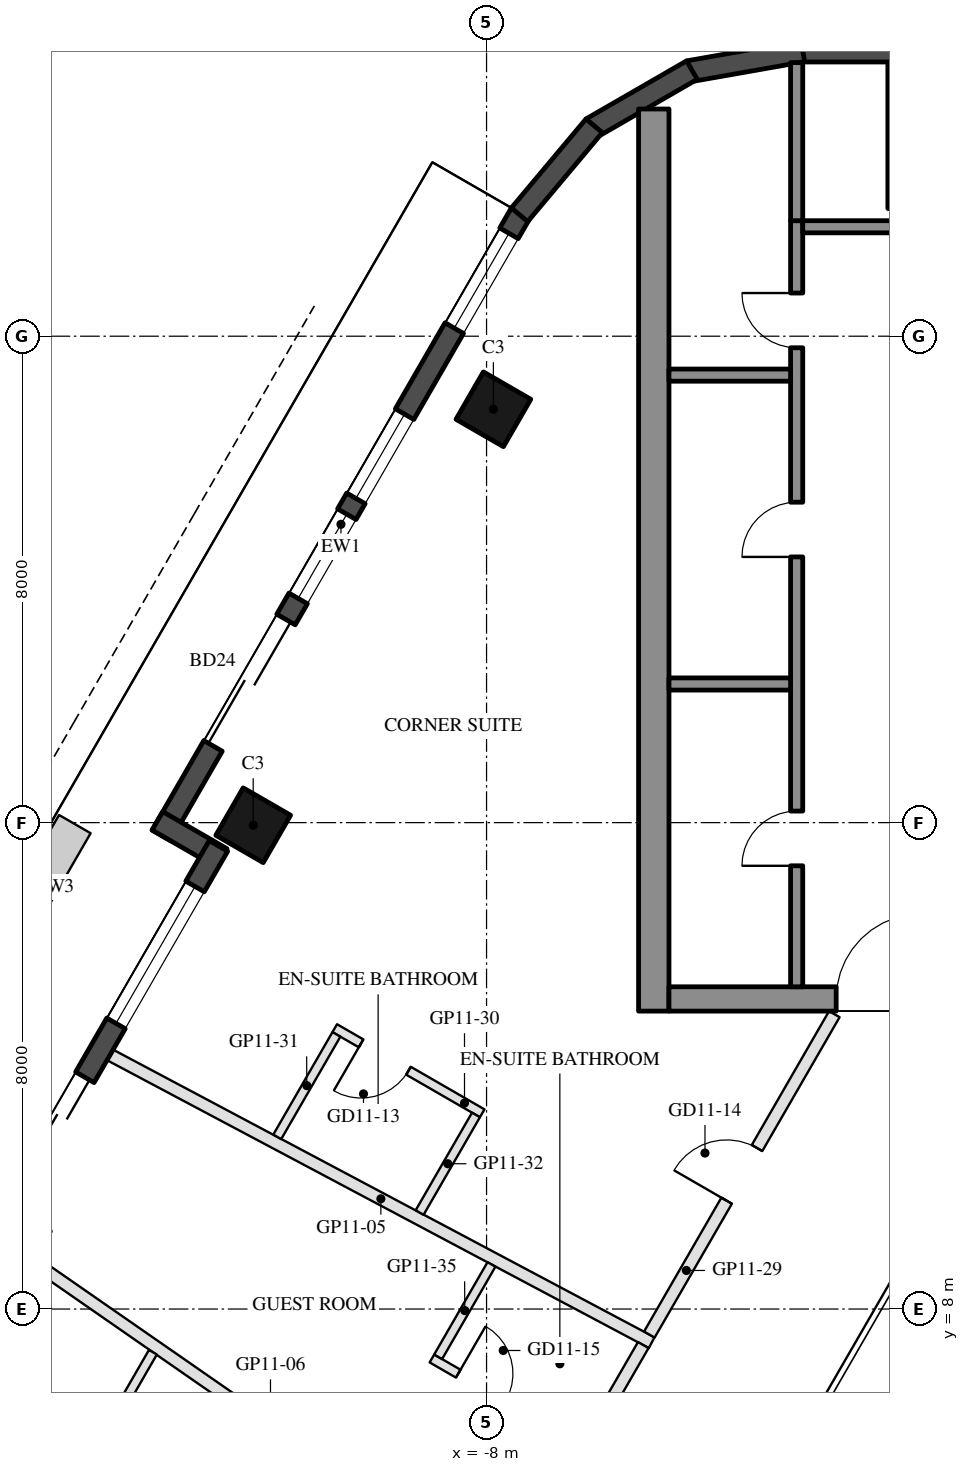
"""IFC4 building model, lengths in metres.
Left out: names, types, materials, properties, quantities, classifications, styles, units other than length and angle.
Written with IfcOpenShell. Run it as: python <this file> out.ifc"""

import sys

from ifc_helpers import new_model, si_unit, direction, frame, frame_2d, origin, origin_2d, place, context, subcontext, project, spatial, rectangle, hollow_rectangle, extrude, element, fill, save


model = new_model("IFC4")
c1 = context("Model", 3, precision=1e-05, world=origin(), true_north=direction((0.0, 1.0)))
c2 = subcontext(c1, "Body", "Model", "MODEL_VIEW")
j1 = project(units=[si_unit("LENGTHUNIT", "METRE"), si_unit("PLANEANGLEUNIT", "RADIAN")], contexts=[c1])
p1 = place(None, origin())
s1 = spatial("IfcSite", under=j1, at=p1, CompositionType="ELEMENT")
p2 = place(p1, origin())
s2 = spatial("IfcBuilding", under=s1, at=p2, CompositionType="ELEMENT")
p3 = place(p2, frame((0.0, 0.0, 127.9)))
s3 = spatial("IfcBuildingStorey", under=s2, at=p3, CompositionType="ELEMENT", Elevation=127.9)
for number, where, z_axis, x_axis in (
    (1, (-7.888, 22.798, 0.0), (0.0, 0.0, 1.0), (0.5, 0.866, 0.0)),
    (2, (-11.838, 15.957, 0.0), (0.0, 0.0, 1.0), (0.5, 0.866, 0.0)),
):
    element("IfcColumn", number, at=place(p3, frame(where, z_axis=z_axis, x_axis=x_axis)), inside=s3, PredefinedType="COLUMN", context=c2, shape_type="SweptSolid", body=[
        extrude(hollow_rectangle(XDim=0.9, YDim=0.9, WallThickness=0.04, at=origin_2d()), origin(), (0.0, 0.0, 1.0), 3.7),
    ])
p4 = place(p3, frame((0.0, 27.3, 0.0), z_axis=(0.0, 0.0, 1.0), x_axis=(1.0, 0.0, 0.0)))
e3 = element("IfcColumn", 3, at=p4, inside=s3, PredefinedType="COLUMN", context=c2, shape_type="SweptSolid", body=[
    extrude(hollow_rectangle(XDim=2.8, YDim=2.4, WallThickness=0.07, at=origin_2d()), origin(), (0.0, 0.0, 1.0), 3.7),
])
p5 = place(p3, frame((-7.441, 26.022, 0.0), z_axis=(0.0, 0.0, 1.0), x_axis=(-0.499992533062, -0.86602971478, 0.0)))
e4 = element("IfcWall", 4, at=p5, inside=s3, PredefinedType="SOLIDWALL", context=c2, shape_type="SweptSolid", body=[
    extrude(rectangle(XDim=11.816, YDim=0.35, at=frame_2d((5.908, 0.0))), origin(), (0.0, 0.0, 1.0), 3.45),
])
p6 = place(p5, frame((0.381, 0.0, 0.3)))
e5 = element("IfcOpeningElement", 5, at=p6, cuts=e4, PredefinedType="OPENING", context=c2, shape_type="SweptSolid", body=[
    extrude(rectangle(XDim=1.8, YDim=2.65, at=frame_2d((0.9, 1.325))), frame((0.0, 0.185, 0.0), z_axis=(0.0, -1.0, 0.0), x_axis=(1.0, 0.0, 0.0)), (0.0, 0.0, 1.0), 0.37),
])
p7 = place(p5, frame((7.716, 0.0, 0.0)))
e6 = element("IfcOpeningElement", 6, at=p7, cuts=e4, PredefinedType="OPENING", context=c2, shape_type="SweptSolid", body=[
    extrude(rectangle(XDim=2.4, YDim=2.4, at=frame_2d((1.2, 1.2))), frame((0.0, 0.185, 0.0), z_axis=(0.0, -1.0, 0.0), x_axis=(1.0, 0.0, 0.0)), (0.0, 0.0, 1.0), 0.37),
])
p8 = place(p5, frame((3.815, 0.0, 0.3)))
e7 = element("IfcOpeningElement", 7, at=p8, cuts=e4, PredefinedType="OPENING", context=c2, shape_type="SweptSolid", body=[
    extrude(rectangle(XDim=1.6, YDim=2.65, at=frame_2d((0.8, 1.325))), frame((0.0, 0.185, 0.0), z_axis=(0.0, -1.0, 0.0), x_axis=(1.0, 0.0, 0.0)), (0.0, 0.0, 1.0), 0.37),
])
p9 = place(p5, frame((5.715, 0.0, 0.3)))
e8 = element("IfcOpeningElement", 8, at=p9, cuts=e4, PredefinedType="OPENING", context=c2, shape_type="SweptSolid", body=[
    extrude(rectangle(XDim=1.6, YDim=2.65, at=frame_2d((0.8, 1.325))), frame((0.0, 0.185, 0.0), z_axis=(0.0, -1.0, 0.0), x_axis=(1.0, 0.0, 0.0)), (0.0, 0.0, 1.0), 0.37),
])
p10 = place(p3, frame((-13.413, 16.029, 0.0), z_axis=(0.0, 0.0, 1.0), x_axis=(0.866005645448, -0.500034220881, 0.0)))
e9 = element("IfcWall", 9, at=p10, inside=s3, PredefinedType="SOLIDWALL", context=c2, shape_type="SweptSolid", body=[
    extrude(rectangle(XDim=1.22, YDim=0.35, at=frame_2d((0.61, 0.0))), origin(), (0.0, 0.0, 1.0), 3.45),
])
p11 = place(p3, frame((-12.409, 15.617, 0.0), z_axis=(0.0, 0.0, 1.0), x_axis=(-0.500003597184, -0.866023326939, 0.0)))
e10 = element("IfcWall", 10, at=p11, inside=s3, PredefinedType="SOLIDWALL", context=c2, shape_type="SweptSolid", body=[
    extrude(rectangle(XDim=6.74, YDim=0.35, at=frame_2d((3.37, 0.0))), origin(), (0.0, 0.0, 1.0), 3.45),
])
p12 = place(p11, frame((0.77, 0.0, 0.3)))
e11 = element("IfcOpeningElement", 11, at=p12, cuts=e10, PredefinedType="OPENING", context=c2, shape_type="SweptSolid", body=[
    extrude(rectangle(XDim=2.6, YDim=2.65, at=frame_2d((1.3, 1.325))), frame((0.0, 0.185, 0.0), z_axis=(0.0, -1.0, 0.0), x_axis=(1.0, 0.0, 0.0)), (0.0, 0.0, 1.0), 0.37),
])
p13 = place(p11, frame((4.394, 0.0, 0.0)))
e12 = element("IfcOpeningElement", 12, at=p13, cuts=e10, PredefinedType="OPENING", context=c2, shape_type="SweptSolid", body=[
    extrude(rectangle(XDim=1.5, YDim=2.4, at=frame_2d((0.75, 1.2))), frame((0.0, 0.185, 0.0), z_axis=(0.0, -1.0, 0.0), x_axis=(1.0, 0.0, 0.0)), (0.0, 0.0, 1.0), 0.37),
])
p14 = place(p3, frame((2.829, 28.685, 0.0), z_axis=(0.0, 0.0, 1.0), x_axis=(-1.0, 0.0, 0.0)))
e13 = element("IfcWall", 13, at=p14, inside=s3, PredefinedType="SOLIDWALL", context=c2, shape_type="SweptSolid", body=[
    extrude(rectangle(XDim=5.658, YDim=0.35, at=frame_2d((2.829, 0.0))), origin(), (0.0, 0.0, 1.0), 3.45),
])
for number, where, z_axis, x_axis in (
    (14, (-2.799, 28.688, 0.0), (0.0, 0.0, 1.0), (-0.985, -0.174, 0.0)),
    (15, (-4.623, 28.377, 0.0), (0.0, 0.0, 1.0), (-0.866, -0.5, 0.0)),
):
    element("IfcWall", number, at=place(p3, frame(where, z_axis=z_axis, x_axis=x_axis)), inside=s3, PredefinedType="SOLIDWALL", context=c2, shape_type="SweptSolid", body=[
        extrude(rectangle(XDim=1.91, YDim=0.35, at=frame_2d((0.955, 0.0))), origin(), (0.0, 0.0, 1.0), 3.45),
    ])
p15 = place(p3, frame((-6.23, 27.461, 0.0), z_axis=(0.0, 0.0, 1.0), x_axis=(-0.642808304945, -0.766027077259, 0.0)))
e16 = element("IfcWall", 16, at=p15, inside=s3, PredefinedType="SOLIDWALL", context=c2, shape_type="SweptSolid", body=[
    extrude(rectangle(XDim=1.91, YDim=0.35, at=frame_2d((0.955, 0.0))), origin(), (0.0, 0.0, 1.0), 3.45),
])
p16 = place(p3, frame((-5.25, 12.9, 0.0), z_axis=(0.0, 0.0, 1.0), x_axis=(0.0, 1.0, 0.0)))
e17 = element("IfcWall", 17, at=p16, inside=s3, PredefinedType="SHEAR", context=c2, shape_type="SweptSolid", body=[
    extrude(rectangle(XDim=14.837, YDim=0.5, at=frame_2d((7.418, 0.0))), origin(), (0.0, 0.0, 1.0), 3.45),
])
p17 = place(p3, frame((5.0, 13.1, 0.0), z_axis=(0.0, 0.0, 1.0), x_axis=(-1.0, 0.0, 0.0)))
e18 = element("IfcWall", 18, at=p17, inside=s3, PredefinedType="SHEAR", context=c2, shape_type="SweptSolid", body=[
    extrude(rectangle(XDim=10.0, YDim=0.4, at=frame_2d((5.0, 0.0))), origin(), (0.0, 0.0, 1.0), 3.45),
])
p18 = place(p17, frame((3.55, 0.0, 0.0)))
e19 = element("IfcOpeningElement", 19, at=p18, cuts=e18, PredefinedType="OPENING", context=c2, shape_type="SweptSolid", body=[
    extrude(rectangle(XDim=1.1, YDim=2.1, at=frame_2d((0.55, 1.05))), frame((0.0, 0.21, 0.0), z_axis=(0.0, -1.0, 0.0), x_axis=(1.0, 0.0, 0.0)), (0.0, 0.0, 1.0), 0.42),
])
p19 = place(p17, frame((5.85, 0.0, 0.0)))
e20 = element("IfcOpeningElement", 20, at=p19, cuts=e18, PredefinedType="OPENING", context=c2, shape_type="SweptSolid", body=[
    extrude(rectangle(XDim=1.4, YDim=2.1, at=frame_2d((0.7, 1.05))), frame((0.0, 0.21, 0.0), z_axis=(0.0, -1.0, 0.0), x_axis=(1.0, 0.0, 0.0)), (0.0, 0.0, 1.0), 0.42),
])
p20 = place(p3, frame((-2.9, 13.3, 0.0), z_axis=(0.0, 0.0, 1.0), x_axis=(0.0, 1.0, 0.0)))
e21 = element("IfcWall", 21, at=p20, inside=s3, PredefinedType="SHEAR", context=c2, shape_type="SweptSolid", body=[
    extrude(rectangle(XDim=12.6, YDim=0.2, at=frame_2d((6.3, 0.0))), origin(), (0.0, 0.0, 1.0), 3.45),
])
p21 = place(p20, frame((1.99, 0.0, 0.0)))
e22 = element("IfcOpeningElement", 22, at=p21, cuts=e21, PredefinedType="OPENING", context=c2, shape_type="SweptSolid", body=[
    extrude(rectangle(XDim=0.9, YDim=2.1, at=frame_2d((0.45, 1.05))), frame((0.0, 0.11, 0.0), z_axis=(0.0, -1.0, 0.0), x_axis=(1.0, 0.0, 0.0)), (0.0, 0.0, 1.0), 0.22),
])
p22 = place(p20, frame((7.07, 0.0, 0.0)))
e23 = element("IfcOpeningElement", 23, at=p22, cuts=e21, PredefinedType="OPENING", context=c2, shape_type="SweptSolid", body=[
    extrude(rectangle(XDim=0.9, YDim=2.1, at=frame_2d((0.45, 1.05))), frame((0.0, 0.11, 0.0), z_axis=(0.0, -1.0, 0.0), x_axis=(1.0, 0.0, 0.0)), (0.0, 0.0, 1.0), 0.22),
])
p23 = place(p20, frame((10.51, 0.0, 0.0)))
e24 = element("IfcOpeningElement", 24, at=p23, cuts=e21, PredefinedType="OPENING", context=c2, shape_type="SweptSolid", body=[
    extrude(rectangle(XDim=0.9, YDim=2.1, at=frame_2d((0.45, 1.05))), frame((0.0, 0.11, 0.0), z_axis=(0.0, -1.0, 0.0), x_axis=(1.0, 0.0, 0.0)), (0.0, 0.0, 1.0), 0.22),
])
p24 = place(p3, frame((-0.4, 25.8, 0.0), z_axis=(0.0, 0.0, 1.0), x_axis=(-1.0, 0.0, 0.0)))
e25 = element("IfcWall", 25, at=p24, inside=s3, PredefinedType="SHEAR", context=c2, shape_type="SweptSolid", body=[
    extrude(rectangle(XDim=2.4, YDim=0.2, at=frame_2d((1.2, 0.0))), origin(), (0.0, 0.0, 1.0), 3.45),
])
for number, where, z_axis, x_axis in (
    (26, (-3.0, 18.28, 0.0), (0.0, 0.0, 1.0), (-1.0, 0.0, 0.0)),
    (27, (-3.0, 23.36, 0.0), (0.0, 0.0, 1.0), (-1.0, 0.0, 0.0)),
):
    element("IfcWall", number, at=place(p3, frame(where, z_axis=z_axis, x_axis=x_axis)), inside=s3, PredefinedType="SHEAR", context=c2, shape_type="SweptSolid", body=[
        extrude(rectangle(XDim=2.0, YDim=0.2, at=frame_2d((1.0, 0.0))), origin(), (0.0, 0.0, 1.0), 3.45),
    ])
p25 = place(p3, frame((-2.9, 25.9, 0.0), z_axis=(0.0, 0.0, 1.0), x_axis=(0.0, 1.0, 0.0)))
e28 = element("IfcWall", 28, at=p25, inside=s3, PredefinedType="SHEAR", context=c2, shape_type="SweptSolid", body=[
    extrude(rectangle(XDim=2.6, YDim=0.2, at=frame_2d((1.3, 0.0))), origin(), (0.0, 0.0, 1.0), 3.45),
])
p26 = place(p3, frame((-14.192, 12.179, 0.0), z_axis=(0.0, 0.0, 1.0), x_axis=(0.883106944183, -0.469171743753, 0.0)))
e29 = element("IfcWall", 29, at=p26, inside=s3, PredefinedType="PARTITIONING", context=c2, shape_type="SweptSolid", body=[
    extrude(rectangle(XDim=10.086, YDim=0.2, at=frame_2d((5.043, 0.0))), origin(), (0.0, 0.0, 1.0), 2.76),
])
p27 = place(p3, frame((-15.46, 8.781, 0.0), z_axis=(0.0, 0.0, 1.0), x_axis=(0.82142273434, -0.570319815113, 0.0)))
e30 = element("IfcWall", 30, at=p27, inside=s3, PredefinedType="PARTITIONING", context=c2, shape_type="SweptSolid", body=[
    extrude(rectangle(XDim=9.513, YDim=0.2, at=frame_2d((4.756, 0.0))), origin(), (0.0, 0.0, 1.0), 2.76),
])
p28 = place(p3, frame((-5.323, 7.581, 0.0), z_axis=(0.0, 0.0, 1.0), x_axis=(0.49998410452, 0.866034580849, 0.0)))
e31 = element("IfcWall", 31, at=p28, inside=s3, PredefinedType="PARTITIONING", context=c2, shape_type="SweptSolid", body=[
    extrude(rectangle(XDim=6.085, YDim=0.2, at=frame_2d((3.042, 0.0))), origin(), (0.0, 0.0, 1.0), 2.76),
])
p29 = place(p28, frame((2.542, 0.0, 0.0)))
e32 = element("IfcOpeningElement", 32, at=p29, cuts=e31, PredefinedType="OPENING", context=c2, shape_type="SweptSolid", body=[
    extrude(rectangle(XDim=1.0, YDim=2.1, at=frame_2d((0.5, 1.05))), frame((0.0, 0.11, 0.0), z_axis=(0.0, -1.0, 0.0), x_axis=(1.0, 0.0, 0.0)), (0.0, 0.0, 1.0), 0.22),
])
p30 = place(p3, frame((-8.072, 11.219, 0.0), z_axis=(0.0, 0.0, 1.0), x_axis=(-0.866034573852, 0.49998411664, 0.0)))
e33 = element("IfcWall", 33, at=p30, inside=s3, PredefinedType="PARTITIONING", context=c2, shape_type="SweptSolid", body=[
    extrude(rectangle(XDim=2.8, YDim=0.15, at=frame_2d((1.4, 0.0))), origin(), (0.0, 0.0, 1.0), 3.45),
])
p31 = place(p30, frame((1.4, 0.0, 0.0)))
e34 = element("IfcOpeningElement", 34, at=p31, cuts=e33, PredefinedType="OPENING", context=c2, shape_type="SweptSolid", body=[
    extrude(rectangle(XDim=0.9, YDim=2.1, at=frame_2d((0.45, 1.05))), frame((0.0, 0.085, 0.0), z_axis=(0.0, -1.0, 0.0), x_axis=(1.0, 0.0, 0.0)), (0.0, 0.0, 1.0), 0.17),
])
p32 = place(p3, frame((-10.469, 12.517, 0.0), z_axis=(0.0, 0.0, 1.0), x_axis=(-0.500051850797, -0.865995465643, 0.0)))
e35 = element("IfcWall", 35, at=p32, inside=s3, PredefinedType="PARTITIONING", context=c2, shape_type="SweptSolid", body=[
    extrude(rectangle(XDim=1.946, YDim=0.15, at=frame_2d((0.973, 0.0))), origin(), (0.0, 0.0, 1.0), 2.76),
])
p33 = place(p3, frame((-8.174, 11.192, 0.0), z_axis=(0.0, 0.0, 1.0), x_axis=(-0.500022870649, -0.866012199007, 0.0)))
e36 = element("IfcWall", 36, at=p33, inside=s3, PredefinedType="PARTITIONING", context=c2, shape_type="SweptSolid", body=[
    extrude(rectangle(XDim=1.853, YDim=0.15, at=frame_2d((0.926, 0.0))), origin(), (0.0, 0.0, 1.0), 2.76),
])
p34 = place(p3, frame((-7.679, 3.5, 0.0), z_axis=(0.0, 0.0, 1.0), x_axis=(0.500026934738, 0.866009852448, 0.0)))
e37 = element("IfcWall", 37, at=p34, inside=s3, PredefinedType="PARTITIONING", context=c2, shape_type="SweptSolid", body=[
    extrude(rectangle(XDim=4.511, YDim=0.2, at=frame_2d((2.256, 0.0))), origin(), (0.0, 0.0, 1.0), 2.76),
])
p35 = place(p34, frame((1.058, 0.0, 0.0)))
e38 = element("IfcOpeningElement", 38, at=p35, cuts=e37, PredefinedType="OPENING", context=c2, shape_type="SweptSolid", body=[
    extrude(rectangle(XDim=1.0, YDim=2.1, at=frame_2d((0.5, 1.05))), frame((0.0, 0.11, 0.0), z_axis=(0.0, -1.0, 0.0), x_axis=(1.0, 0.0, 0.0)), (0.0, 0.0, 1.0), 0.22),
])
p36 = place(p3, frame((-8.899, 7.187, 0.0), z_axis=(0.0, 0.0, 1.0), x_axis=(0.866056369097, -0.49994636267, 0.0)))
e39 = element("IfcWall", 39, at=p36, inside=s3, PredefinedType="PARTITIONING", context=c2, shape_type="SweptSolid", body=[
    extrude(rectangle(XDim=2.8, YDim=0.15, at=frame_2d((1.4, 0.0))), origin(), (0.0, 0.0, 1.0), 3.45),
])
p37 = place(p36, frame((0.5, 0.0, 0.0)))
e40 = element("IfcOpeningElement", 40, at=p37, cuts=e39, PredefinedType="OPENING", context=c2, shape_type="SweptSolid", body=[
    extrude(rectangle(XDim=0.9, YDim=2.1, at=frame_2d((0.45, 1.05))), frame((0.0, 0.085, 0.0), z_axis=(0.0, -1.0, 0.0), x_axis=(1.0, 0.0, 0.0)), (0.0, 0.0, 1.0), 0.17),
])
p38 = place(p3, frame((-7.919, 8.734, 0.0), z_axis=(0.0, 0.0, 1.0), x_axis=(-0.499971461383, -0.866041879935, 0.0)))
e41 = element("IfcWall", 41, at=p38, inside=s3, PredefinedType="PARTITIONING", context=c2, shape_type="SweptSolid", body=[
    extrude(rectangle(XDim=1.754, YDim=0.15, at=frame_2d((0.877, 0.0))), origin(), (0.0, 0.0, 1.0), 3.45),
])
p39 = place(p3, frame((-13.487, 7.29, 0.0), z_axis=(0.0, 0.0, 1.0), x_axis=(-0.500044586128, -0.865999660441, 0.0)))
e42 = element("IfcWall", 42, at=p39, inside=s3, PredefinedType="PARTITIONING", context=c2, shape_type="SweptSolid", body=[
    extrude(rectangle(XDim=2.077, YDim=0.15, at=frame_2d((1.039, 0.0))), origin(), (0.0, 0.0, 1.0), 3.45),
])
p40 = place(p6, origin())
e43 = element("IfcWindow", 43, at=p40, inside=s3, PartitioningType="SINGLE_PANEL", PredefinedType="WINDOW", context=c2, shape_type="SweptSolid", body=[
    extrude(rectangle(XDim=1.8, YDim=2.65, at=frame_2d((0.9, 1.325))), frame((0.0, 0.03, 0.0), z_axis=(0.0, -1.0, 0.0), x_axis=(1.0, 0.0, 0.0)), (0.0, 0.0, 1.0), 0.06),
])
fill(e5, e43)
p41 = place(p7, frame((2.4, 0.0, 0.0), z_axis=(0.0, 0.0, 1.0), x_axis=(-1.0, 0.0, 0.0)))
e44 = element("IfcDoor", 44, at=p41, inside=s3, OperationType="SLIDING_TO_LEFT", PredefinedType="DOOR", context=c2, shape_type="SweptSolid", body=[
    extrude(rectangle(XDim=2.4, YDim=2.4, at=frame_2d((1.2, 1.2))), frame((0.0, 0.025, 0.0), z_axis=(0.0, -1.0, 0.0), x_axis=(1.0, 0.0, 0.0)), (0.0, 0.0, 1.0), 0.05),
])
fill(e6, e44)
p42 = place(p8, origin())
e45 = element("IfcWindow", 45, at=p42, inside=s3, PartitioningType="SINGLE_PANEL", PredefinedType="WINDOW", context=c2, shape_type="SweptSolid", body=[
    extrude(rectangle(XDim=1.6, YDim=2.65, at=frame_2d((0.8, 1.325))), frame((0.0, 0.03, 0.0), z_axis=(0.0, -1.0, 0.0), x_axis=(1.0, 0.0, 0.0)), (0.0, 0.0, 1.0), 0.06),
])
fill(e7, e45)
p43 = place(p9, origin())
e46 = element("IfcWindow", 46, at=p43, inside=s3, PartitioningType="SINGLE_PANEL", PredefinedType="WINDOW", context=c2, shape_type="SweptSolid", body=[
    extrude(rectangle(XDim=1.6, YDim=2.65, at=frame_2d((0.8, 1.325))), frame((0.0, 0.03, 0.0), z_axis=(0.0, -1.0, 0.0), x_axis=(1.0, 0.0, 0.0)), (0.0, 0.0, 1.0), 0.06),
])
fill(e8, e46)
p44 = place(p12, origin())
e47 = element("IfcWindow", 47, at=p44, inside=s3, PartitioningType="SINGLE_PANEL", PredefinedType="WINDOW", context=c2, shape_type="SweptSolid", body=[
    extrude(rectangle(XDim=2.6, YDim=2.65, at=frame_2d((1.3, 1.325))), frame((0.0, 0.03, 0.0), z_axis=(0.0, -1.0, 0.0), x_axis=(1.0, 0.0, 0.0)), (0.0, 0.0, 1.0), 0.06),
])
fill(e11, e47)
p45 = place(p13, frame((1.5, 0.0, 0.0), z_axis=(0.0, 0.0, 1.0), x_axis=(-1.0, 0.0, 0.0)))
e48 = element("IfcDoor", 48, at=p45, inside=s3, OperationType="SLIDING_TO_LEFT", PredefinedType="DOOR", context=c2, shape_type="SweptSolid", body=[
    extrude(rectangle(XDim=1.5, YDim=2.4, at=frame_2d((0.75, 1.2))), frame((0.0, 0.025, 0.0), z_axis=(0.0, -1.0, 0.0), x_axis=(1.0, 0.0, 0.0)), (0.0, 0.0, 1.0), 0.05),
])
fill(e12, e48)
p46 = place(p21, origin())
e49 = element("IfcDoor", 49, at=p46, inside=s3, OperationType="SINGLE_SWING_LEFT", PredefinedType="DOOR", context=c2, shape_type="SweptSolid", body=[
    extrude(rectangle(XDim=0.9, YDim=2.1, at=frame_2d((0.45, 1.05))), frame((0.0, 0.025, 0.0), z_axis=(0.0, -1.0, 0.0), x_axis=(1.0, 0.0, 0.0)), (0.0, 0.0, 1.0), 0.05),
])
fill(e22, e49)
p47 = place(p22, origin())
e50 = element("IfcDoor", 50, at=p47, inside=s3, OperationType="SINGLE_SWING_LEFT", PredefinedType="DOOR", context=c2, shape_type="SweptSolid", body=[
    extrude(rectangle(XDim=0.9, YDim=2.1, at=frame_2d((0.45, 1.05))), frame((0.0, 0.025, 0.0), z_axis=(0.0, -1.0, 0.0), x_axis=(1.0, 0.0, 0.0)), (0.0, 0.0, 1.0), 0.05),
])
fill(e23, e50)
p48 = place(p23, origin())
e51 = element("IfcDoor", 51, at=p48, inside=s3, OperationType="SINGLE_SWING_RIGHT", PredefinedType="DOOR", context=c2, shape_type="SweptSolid", body=[
    extrude(rectangle(XDim=0.9, YDim=2.1, at=frame_2d((0.45, 1.05))), frame((0.0, 0.025, 0.0), z_axis=(0.0, -1.0, 0.0), x_axis=(1.0, 0.0, 0.0)), (0.0, 0.0, 1.0), 0.05),
])
fill(e24, e51)
p49 = place(p19, frame((1.4, 0.0, 0.0), z_axis=(0.0, 0.0, 1.0), x_axis=(-1.0, 0.0, 0.0)))
e52 = element("IfcDoor", 52, at=p49, inside=s3, OperationType="DOUBLE_DOOR_SINGLE_SWING", PredefinedType="DOOR", context=c2, shape_type="SweptSolid", body=[
    extrude(rectangle(XDim=1.4, YDim=2.1, at=frame_2d((0.7, 1.05))), frame((0.0, 0.025, 0.0), z_axis=(0.0, -1.0, 0.0), x_axis=(1.0, 0.0, 0.0)), (0.0, 0.0, 1.0), 0.05),
])
fill(e20, e52)
p50 = place(p31, origin())
e53 = element("IfcDoor", 53, at=p50, inside=s3, OperationType="SINGLE_SWING_RIGHT", PredefinedType="DOOR", context=c2, shape_type="SweptSolid", body=[
    extrude(rectangle(XDim=0.9, YDim=2.1, at=frame_2d((0.45, 1.05))), frame((0.0, 0.025, 0.0), z_axis=(0.0, -1.0, 0.0), x_axis=(1.0, 0.0, 0.0)), (0.0, 0.0, 1.0), 0.05),
])
fill(e34, e53)
p51 = place(p29, origin())
e54 = element("IfcDoor", 54, at=p51, inside=s3, OperationType="SINGLE_SWING_LEFT", PredefinedType="DOOR", context=c2, shape_type="SweptSolid", body=[
    extrude(rectangle(XDim=1.0, YDim=2.1, at=frame_2d((0.5, 1.05))), frame((0.0, 0.025, 0.0), z_axis=(0.0, -1.0, 0.0), x_axis=(1.0, 0.0, 0.0)), (0.0, 0.0, 1.0), 0.05),
])
fill(e32, e54)
p52 = place(p37, origin())
e55 = element("IfcDoor", 55, at=p52, inside=s3, OperationType="SINGLE_SWING_LEFT", PredefinedType="DOOR", context=c2, shape_type="SweptSolid", body=[
    extrude(rectangle(XDim=0.9, YDim=2.1, at=frame_2d((0.45, 1.05))), frame((0.0, 0.025, 0.0), z_axis=(0.0, -1.0, 0.0), x_axis=(1.0, 0.0, 0.0)), (0.0, 0.0, 1.0), 0.05),
])
fill(e40, e55)
save(model, sys.argv[1])
